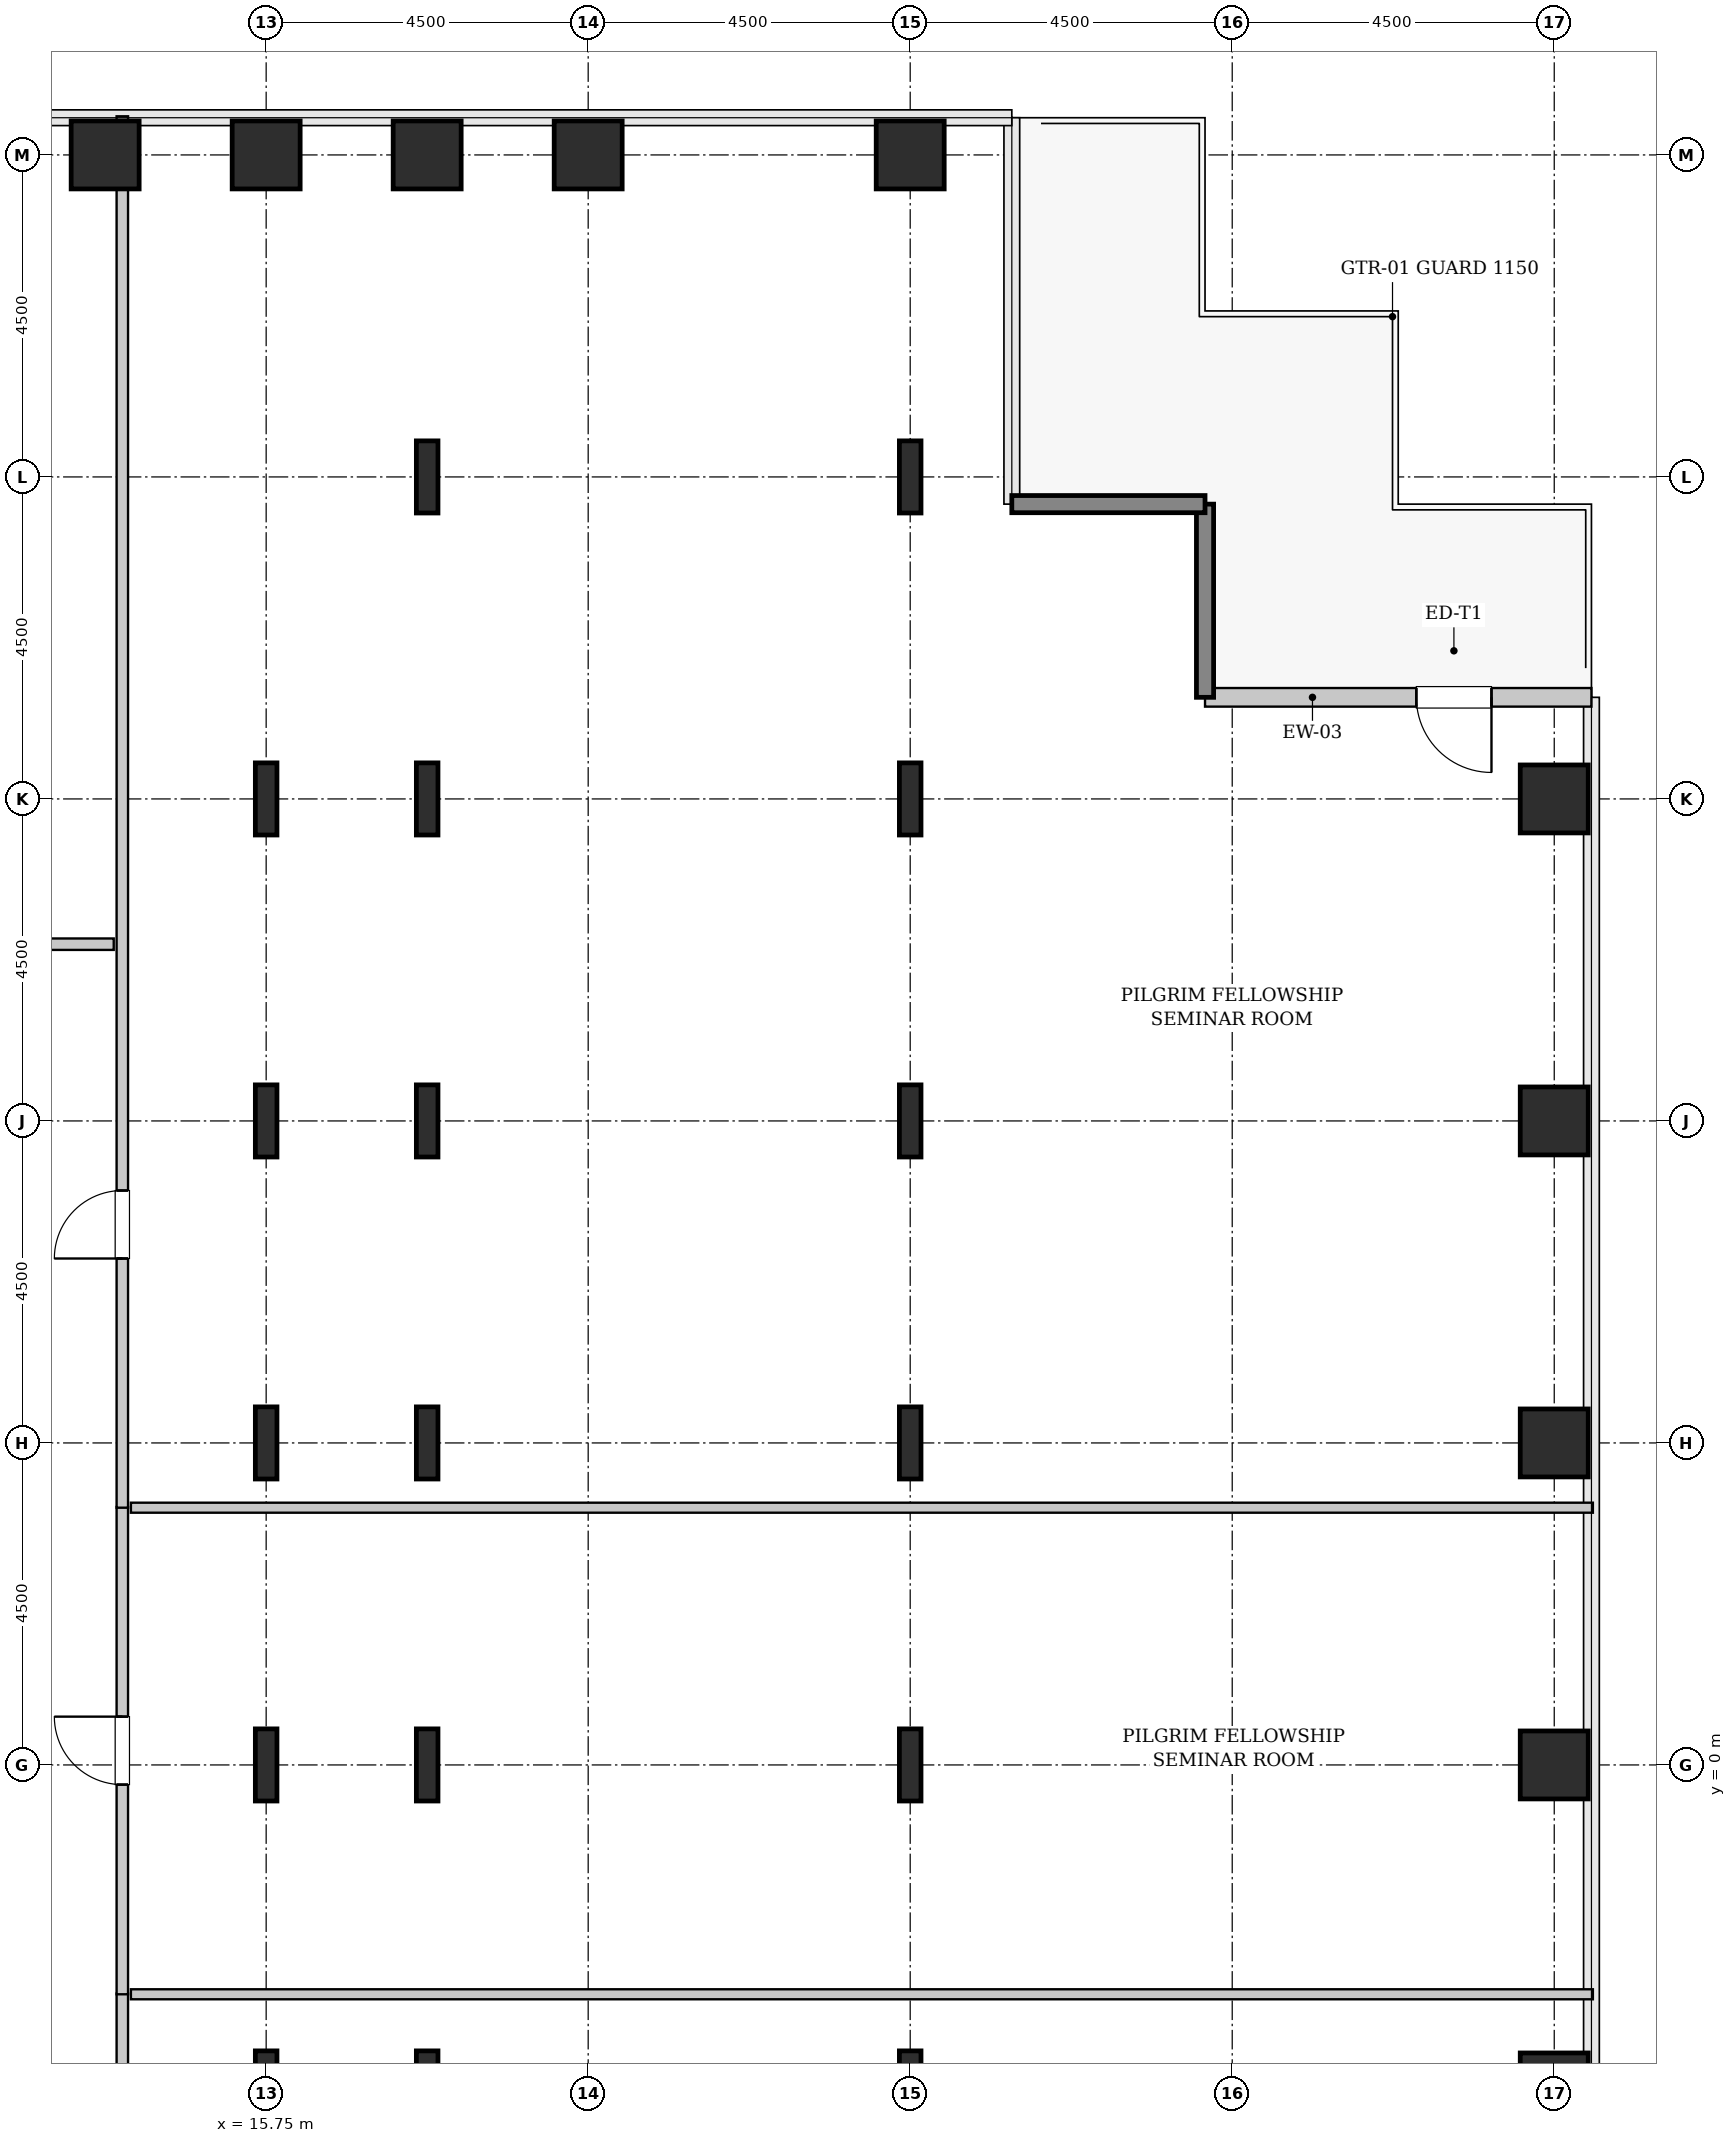
"""IFC4 building model, lengths in metres.
Left out: names, types, materials, properties, quantities, classifications, styles, units other than length and angle.
Written with IfcOpenShell. Run it as: python <this file> out.ifc"""

import sys

from ifc_helpers import new_model, si_unit, direction, frame, frame_2d, origin, origin_2d, place, context, subcontext, project, spatial, rectangle, hollow_rectangle, i_section, extrude, source, transform, mapped, element, fill, save


model = new_model("IFC4")
c1 = context("Model", 3, precision=1e-05, world=origin(), true_north=direction((0.0, 1.0)))
c2 = subcontext(c1, "Body", "Model", "MODEL_VIEW")
j1 = project(units=[si_unit("LENGTHUNIT", "METRE"), si_unit("PLANEANGLEUNIT", "RADIAN")], contexts=[c1])
p1 = place(None, origin())
s1 = spatial("IfcSite", under=j1, at=p1, CompositionType="ELEMENT")
p2 = place(p1, origin())
s2 = spatial("IfcBuilding", under=s1, at=p2, CompositionType="ELEMENT")
p3 = place(p2, frame((0.0, 0.0, 106.0)))
s3 = spatial("IfcBuildingStorey", under=s2, at=p3, CompositionType="ELEMENT", Elevation=106.0)
m1 = source(origin(), c2, "Body", "SweptSolid", [
    extrude(hollow_rectangle(XDim=0.95, YDim=0.95, WallThickness=0.045, InnerFilletRadius=0.045, OuterFilletRadius=0.09, at=origin_2d()), origin(), (0.0, 0.0, 1.0), 3.8),
])
p4 = place(p3, frame((13.5, 22.5, 0.0), z_axis=(0.0, 0.0, 1.0), x_axis=(1.0, 0.0, 0.0)))
e1 = element("IfcColumn", 1, at=p4, inside=s3, PredefinedType="COLUMN", context=c2, shape_type="MappedRepresentation", body=[
    mapped(m1, transform((0.0, 0.0, 0.0), x_axis=(1.0, 0.0, 0.0), y_axis=(0.0, 1.0, 0.0), z_axis=(0.0, 0.0, 1.0), scale=1.0)),
])
m2 = source(origin(), c2, "Body", "SweptSolid", [
    extrude(i_section(OverallWidth=0.302, OverallDepth=1.008, WebThickness=0.021, FlangeThickness=0.04, FilletRadius=0.03, at=origin_2d()), origin(), (0.0, 0.0, 1.0), 3.8),
])
for number, where, z_axis, x_axis in (
    (2, (15.75, -4.5, 0.0), (0.0, 0.0, 1.0), (1.0, 0.0, 0.0)),
    (3, (15.75, 0.0, 0.0), (0.0, 0.0, 1.0), (1.0, 0.0, 0.0)),
    (4, (15.75, 4.5, 0.0), (0.0, 0.0, 1.0), (1.0, 0.0, 0.0)),
    (5, (15.75, 9.0, 0.0), (0.0, 0.0, 1.0), (1.0, 0.0, 0.0)),
    (6, (15.75, 13.5, 0.0), (0.0, 0.0, 1.0), (1.0, 0.0, 0.0)),
):
    element("IfcColumn", number, at=place(p3, frame(where, z_axis=z_axis, x_axis=x_axis)), inside=s3, PredefinedType="COLUMN", context=c2, shape_type="MappedRepresentation", body=[
        mapped(m2, transform((0.0, 0.0, 0.0), x_axis=(1.0, 0.0, 0.0), y_axis=(0.0, 1.0, 0.0), z_axis=(0.0, 0.0, 1.0), scale=1.0)),
    ])
p5 = place(p3, frame((15.75, 22.5, 0.0), z_axis=(0.0, 0.0, 1.0), x_axis=(1.0, 0.0, 0.0)))
e7 = element("IfcColumn", 7, at=p5, inside=s3, PredefinedType="COLUMN", context=c2, shape_type="MappedRepresentation", body=[
    mapped(m1, transform((0.0, 0.0, 0.0), x_axis=(1.0, 0.0, 0.0), y_axis=(0.0, 1.0, 0.0), z_axis=(0.0, 0.0, 1.0), scale=1.0)),
])
for number, where, z_axis, x_axis in (
    (8, (18.0, -4.5, 0.0), (0.0, 0.0, 1.0), (1.0, 0.0, 0.0)),
    (9, (18.0, 0.0, 0.0), (0.0, 0.0, 1.0), (1.0, 0.0, 0.0)),
    (10, (18.0, 4.5, 0.0), (0.0, 0.0, 1.0), (1.0, 0.0, 0.0)),
    (11, (18.0, 9.0, 0.0), (0.0, 0.0, 1.0), (1.0, 0.0, 0.0)),
    (12, (18.0, 13.5, 0.0), (0.0, 0.0, 1.0), (1.0, 0.0, 0.0)),
    (13, (18.0, 18.0, 0.0), (0.0, 0.0, 1.0), (1.0, 0.0, 0.0)),
):
    element("IfcColumn", number, at=place(p3, frame(where, z_axis=z_axis, x_axis=x_axis)), inside=s3, PredefinedType="COLUMN", context=c2, shape_type="MappedRepresentation", body=[
        mapped(m2, transform((0.0, 0.0, 0.0), x_axis=(1.0, 0.0, 0.0), y_axis=(0.0, 1.0, 0.0), z_axis=(0.0, 0.0, 1.0), scale=1.0)),
    ])
for number, where, z_axis, x_axis in (
    (14, (18.0, 22.5, 0.0), (0.0, 0.0, 1.0), (1.0, 0.0, 0.0)),
    (15, (20.25, 22.5, 0.0), (0.0, 0.0, 1.0), (1.0, 0.0, 0.0)),
):
    element("IfcColumn", number, at=place(p3, frame(where, z_axis=z_axis, x_axis=x_axis)), inside=s3, PredefinedType="COLUMN", context=c2, shape_type="MappedRepresentation", body=[
        mapped(m1, transform((0.0, 0.0, 0.0), x_axis=(1.0, 0.0, 0.0), y_axis=(0.0, 1.0, 0.0), z_axis=(0.0, 0.0, 1.0), scale=1.0)),
    ])
for number, where, z_axis, x_axis in (
    (16, (24.75, -4.5, 0.0), (0.0, 0.0, 1.0), (1.0, 0.0, 0.0)),
    (17, (24.75, 0.0, 0.0), (0.0, 0.0, 1.0), (1.0, 0.0, 0.0)),
    (18, (24.75, 4.5, 0.0), (0.0, 0.0, 1.0), (1.0, 0.0, 0.0)),
    (19, (24.75, 9.0, 0.0), (0.0, 0.0, 1.0), (1.0, 0.0, 0.0)),
    (20, (24.75, 13.5, 0.0), (0.0, 0.0, 1.0), (1.0, 0.0, 0.0)),
    (21, (24.75, 18.0, 0.0), (0.0, 0.0, 1.0), (1.0, 0.0, 0.0)),
):
    element("IfcColumn", number, at=place(p3, frame(where, z_axis=z_axis, x_axis=x_axis)), inside=s3, PredefinedType="COLUMN", context=c2, shape_type="MappedRepresentation", body=[
        mapped(m2, transform((0.0, 0.0, 0.0), x_axis=(1.0, 0.0, 0.0), y_axis=(0.0, 1.0, 0.0), z_axis=(0.0, 0.0, 1.0), scale=1.0)),
    ])
for number, where, z_axis, x_axis in (
    (22, (24.75, 22.5, 0.0), (0.0, 0.0, 1.0), (1.0, 0.0, 0.0)),
    (23, (33.75, -4.5, 0.0), (0.0, 0.0, 1.0), (1.0, 0.0, 0.0)),
    (24, (33.75, 0.0, 0.0), (0.0, 0.0, 1.0), (1.0, 0.0, 0.0)),
    (25, (33.75, 4.5, 0.0), (0.0, 0.0, 1.0), (1.0, 0.0, 0.0)),
    (26, (33.75, 9.0, 0.0), (0.0, 0.0, 1.0), (1.0, 0.0, 0.0)),
    (27, (33.75, 13.5, 0.0), (0.0, 0.0, 1.0), (1.0, 0.0, 0.0)),
):
    element("IfcColumn", number, at=place(p3, frame(where, z_axis=z_axis, x_axis=x_axis)), inside=s3, PredefinedType="COLUMN", context=c2, shape_type="MappedRepresentation", body=[
        mapped(m1, transform((0.0, 0.0, 0.0), x_axis=(1.0, 0.0, 0.0), y_axis=(0.0, 1.0, 0.0), z_axis=(0.0, 0.0, 1.0), scale=1.0)),
    ])
m3 = source(origin(), c2, "Body", "SweptSolid", [
    extrude(rectangle(XDim=5.4, YDim=0.26, at=frame_2d((2.7, 0.0))), origin(), (0.0, 0.0, 1.0), 3.55),
])
p6 = place(p3, frame((34.27, 14.92, 0.0), z_axis=(0.0, 0.0, 1.0), x_axis=(-1.0, 0.0, 0.0)))
e28 = element("IfcWall", 28, at=p6, inside=s3, PredefinedType="SOLIDWALL", context=c2, shape_type="MappedRepresentation", body=[
    mapped(m3, transform((0.0, 0.0, 0.0), x_axis=(1.0, 0.0, 0.0), y_axis=(0.0, 1.0, 0.0), z_axis=(0.0, 0.0, 1.0), scale=1.0)),
])
p7 = place(p6, frame((1.397, 0.0, 0.0)))
e29 = element("IfcOpeningElement", 29, at=p7, cuts=e28, PredefinedType="OPENING", context=c2, shape_type="SweptSolid", body=[
    extrude(rectangle(XDim=1.05, YDim=2.2, at=frame_2d((0.525, 1.1))), frame((0.0, 0.14, 0.0), z_axis=(0.0, -1.0, 0.0), x_axis=(1.0, 0.0, 0.0)), (0.0, 0.0, 1.0), 0.28),
])
m4 = source(origin(), c2, "Body", "SweptSolid", [
    extrude(rectangle(XDim=2.7, YDim=0.24, at=frame_2d((1.35, 0.0))), origin(), (0.0, 0.0, 1.0), 3.55),
])
for number, where, z_axis, x_axis in (
    (30, (28.87, 14.92, 0.0), (0.0, 0.0, 1.0), (0.0, 1.0, 0.0)),
    (31, (28.87, 17.62, 0.0), (0.0, 0.0, 1.0), (-1.0, 0.0, 0.0)),
):
    element("IfcWall", number, at=place(p3, frame(where, z_axis=z_axis, x_axis=x_axis)), inside=s3, PredefinedType="SHEAR", context=c2, shape_type="MappedRepresentation", body=[
        mapped(m4, transform((0.0, 0.0, 0.0), x_axis=(1.0, 0.0, 0.0), y_axis=(0.0, 1.0, 0.0), z_axis=(0.0, 0.0, 1.0), scale=1.0)),
    ])
m5 = source(origin(), c2, "Body", "SweptSolid", [
    extrude(rectangle(XDim=19.845, YDim=0.16, at=frame_2d((9.922, 0.0))), origin(), (0.0, 0.0, 1.0), 3.535),
])
p8 = place(p3, frame((13.74, -23.04, 0.0), z_axis=(0.0, 0.0, 1.0), x_axis=(0.0, 1.0, 0.0)))
e32 = element("IfcWall", 32, at=p8, inside=s3, PredefinedType="PARTITIONING", context=c2, shape_type="MappedRepresentation", body=[
    mapped(m5, transform((0.0, 0.0, 0.0), x_axis=(1.0, 0.0, 0.0), y_axis=(0.0, 1.0, 0.0), z_axis=(0.0, 0.0, 1.0), scale=1.0)),
])
p9 = place(p8, frame((15.212, 0.0, 0.0)))
e33 = element("IfcOpeningElement", 33, at=p9, cuts=e32, PredefinedType="OPENING", context=c2, shape_type="SweptSolid", body=[
    extrude(rectangle(XDim=0.95, YDim=2.1, at=frame_2d((0.475, 1.05))), frame((0.0, 0.09, 0.0), z_axis=(0.0, -1.0, 0.0), x_axis=(1.0, 0.0, 0.0)), (0.0, 0.0, 1.0), 0.18),
])
m6 = source(origin(), c2, "Body", "SweptSolid", [
    extrude(rectangle(XDim=20.43, YDim=0.14, at=frame_2d((10.215, 0.0))), origin(), (0.0, 0.0, 1.0), 3.535),
])
p10 = place(p3, frame((13.86, -3.205, 0.0), z_axis=(0.0, 0.0, 1.0), x_axis=(1.0, 0.0, 0.0)))
e34 = element("IfcWall", 34, at=p10, inside=s3, PredefinedType="PARTITIONING", context=c2, shape_type="MappedRepresentation", body=[
    mapped(m6, transform((0.0, 0.0, 0.0), x_axis=(1.0, 0.0, 0.0), y_axis=(0.0, 1.0, 0.0), z_axis=(0.0, 0.0, 1.0), scale=1.0)),
])
m7 = source(origin(), c2, "Body", "SweptSolid", [
    extrude(rectangle(XDim=6.81, YDim=0.16, at=frame_2d((3.405, 0.0))), origin(), (0.0, 0.0, 1.0), 3.535),
])
p11 = place(p3, frame((13.74, -3.205, 0.0), z_axis=(0.0, 0.0, 1.0), x_axis=(0.0, 1.0, 0.0)))
e35 = element("IfcWall", 35, at=p11, inside=s3, PredefinedType="PARTITIONING", context=c2, shape_type="MappedRepresentation", body=[
    mapped(m7, transform((0.0, 0.0, 0.0), x_axis=(1.0, 0.0, 0.0), y_axis=(0.0, 1.0, 0.0), z_axis=(0.0, 0.0, 1.0), scale=1.0)),
])
p12 = place(p11, frame((2.93, 0.0, 0.0)))
e36 = element("IfcOpeningElement", 36, at=p12, cuts=e35, PredefinedType="OPENING", context=c2, shape_type="SweptSolid", body=[
    extrude(rectangle(XDim=0.95, YDim=2.1, at=frame_2d((0.475, 1.05))), frame((0.0, 0.09, 0.0), z_axis=(0.0, -1.0, 0.0), x_axis=(1.0, 0.0, 0.0)), (0.0, 0.0, 1.0), 0.18),
])
p13 = place(p3, frame((13.86, 3.595, 0.0), z_axis=(0.0, 0.0, 1.0), x_axis=(1.0, 0.0, 0.0)))
e37 = element("IfcWall", 37, at=p13, inside=s3, PredefinedType="PARTITIONING", context=c2, shape_type="MappedRepresentation", body=[
    mapped(m6, transform((0.0, 0.0, 0.0), x_axis=(1.0, 0.0, 0.0), y_axis=(0.0, 1.0, 0.0), z_axis=(0.0, 0.0, 1.0), scale=1.0)),
])
m8 = source(origin(), c2, "Body", "SweptSolid", [
    extrude(rectangle(XDim=19.445, YDim=0.16, at=frame_2d((9.723, 0.0))), origin(), (0.0, 0.0, 1.0), 3.535),
])
p14 = place(p3, frame((13.74, 3.595, 0.0), z_axis=(0.0, 0.0, 1.0), x_axis=(0.0, 1.0, 0.0)))
e38 = element("IfcWall", 38, at=p14, inside=s3, PredefinedType="PARTITIONING", context=c2, shape_type="MappedRepresentation", body=[
    mapped(m8, transform((0.0, 0.0, 0.0), x_axis=(1.0, 0.0, 0.0), y_axis=(0.0, 1.0, 0.0), z_axis=(0.0, 0.0, 1.0), scale=1.0)),
])
p15 = place(p14, frame((3.482, 0.0, 0.0)))
e39 = element("IfcOpeningElement", 39, at=p15, cuts=e38, PredefinedType="OPENING", context=c2, shape_type="SweptSolid", body=[
    extrude(rectangle(XDim=0.95, YDim=2.1, at=frame_2d((0.475, 1.05))), frame((0.0, 0.09, 0.0), z_axis=(0.0, -1.0, 0.0), x_axis=(1.0, 0.0, 0.0)), (0.0, 0.0, 1.0), 0.18),
])
m9 = source(origin(), c2, "Body", "SweptSolid", [
    extrude(rectangle(XDim=7.66, YDim=0.16, at=frame_2d((3.83, 0.0))), origin(), (0.0, 0.0, 1.0), 3.535),
])
p16 = place(p3, frame((5.96, 11.47, 0.0), z_axis=(0.0, 0.0, 1.0), x_axis=(1.0, 0.0, 0.0)))
e40 = element("IfcWall", 40, at=p16, inside=s3, PredefinedType="PARTITIONING", context=c2, shape_type="MappedRepresentation", body=[
    mapped(m9, transform((0.0, 0.0, 0.0), x_axis=(1.0, 0.0, 0.0), y_axis=(0.0, 1.0, 0.0), z_axis=(0.0, 0.0, 1.0), scale=1.0)),
])
p17 = place(p16, frame((3.355, 0.0, 0.0)))
e41 = element("IfcOpeningElement", 41, at=p17, cuts=e40, PredefinedType="OPENING", context=c2, shape_type="SweptSolid", body=[
    extrude(rectangle(XDim=0.95, YDim=2.1, at=frame_2d((0.475, 1.05))), frame((0.0, 0.09, 0.0), z_axis=(0.0, -1.0, 0.0), x_axis=(1.0, 0.0, 0.0)), (0.0, 0.0, 1.0), 0.18),
])
m10 = source(origin(), c2, "Body", "SweptSolid", [
    extrude(rectangle(XDim=1.05, YDim=2.2, at=frame_2d((0.525, 1.1))), frame((0.0, 0.025, 0.0), z_axis=(0.0, -1.0, 0.0), x_axis=(1.0, 0.0, 0.0)), (0.0, 0.0, 1.0), 0.05),
])
p18 = place(p7, origin())
e42 = element("IfcDoor", 42, at=p18, inside=s3, OperationType="SINGLE_SWING_LEFT", PredefinedType="DOOR", context=c2, shape_type="MappedRepresentation", body=[
    mapped(m10, transform((0.0, 0.0, 0.0), x_axis=(1.0, 0.0, 0.0), y_axis=(0.0, 1.0, 0.0), z_axis=(0.0, 0.0, 1.0), scale=1.0)),
])
fill(e29, e42)
m11 = source(origin(), c2, "Body", "SweptSolid", [
    extrude(rectangle(XDim=0.95, YDim=2.1, at=frame_2d((0.475, 1.05))), frame((0.0, 0.025, 0.0), z_axis=(0.0, -1.0, 0.0), x_axis=(1.0, 0.0, 0.0)), (0.0, 0.0, 1.0), 0.05),
])
p19 = place(p12, origin())
e43 = element("IfcDoor", 43, at=p19, inside=s3, OperationType="SINGLE_SWING_RIGHT", PredefinedType="DOOR", context=c2, shape_type="MappedRepresentation", body=[
    mapped(m11, transform((0.0, 0.0, 0.0), x_axis=(1.0, 0.0, 0.0), y_axis=(0.0, 1.0, 0.0), z_axis=(0.0, 0.0, 1.0), scale=1.0)),
])
fill(e36, e43)
p20 = place(p15, origin())
e44 = element("IfcDoor", 44, at=p20, inside=s3, OperationType="SINGLE_SWING_LEFT", PredefinedType="DOOR", context=c2, shape_type="MappedRepresentation", body=[
    mapped(m11, transform((0.0, 0.0, 0.0), x_axis=(1.0, 0.0, 0.0), y_axis=(0.0, 1.0, 0.0), z_axis=(0.0, 0.0, 1.0), scale=1.0)),
])
fill(e39, e44)
save(model, sys.argv[1])
